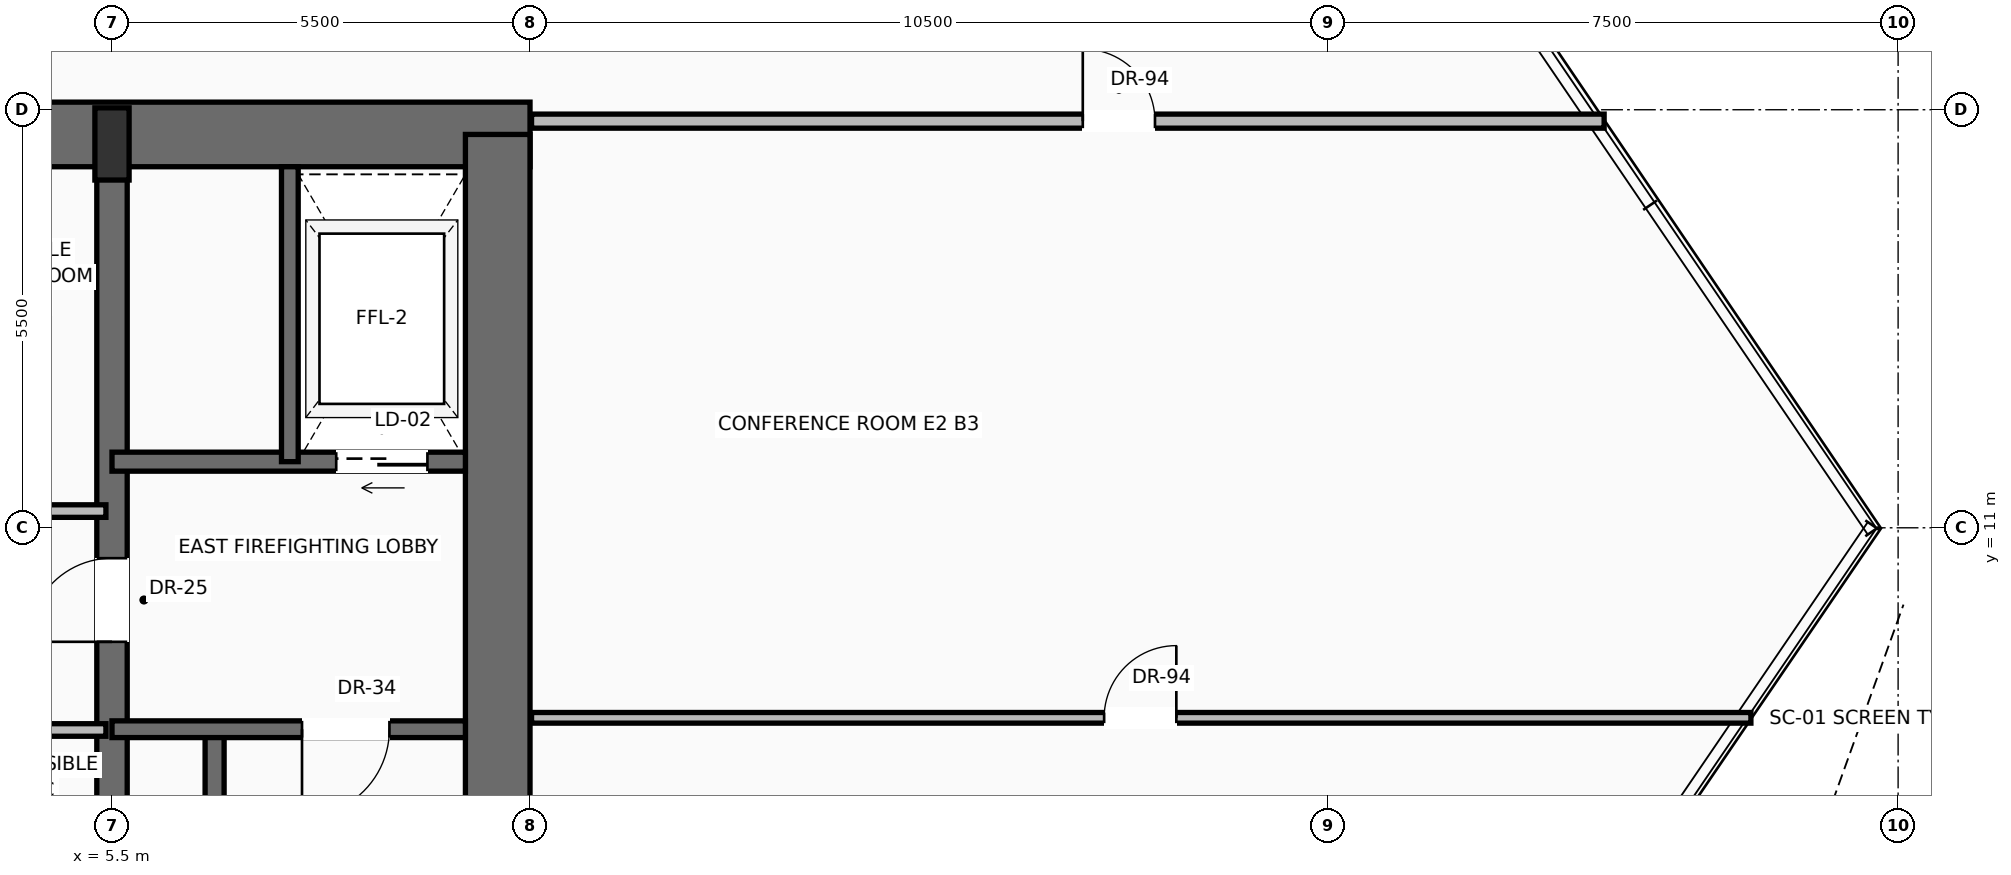
"""IFC4 building model, lengths in metres.
Left out: names, types, materials, properties, quantities, classifications, styles, units other than length and angle.
Written with IfcOpenShell. Run it as: python <this file> out.ifc"""

import sys

from ifc_helpers import new_model, si_unit, direction, frame, frame_2d, origin, origin_2d, place, context, subcontext, project, spatial, rectangle, extrude, source, transform, mapped, element, fill, save


model = new_model("IFC4")
c1 = context("Model", 3, precision=1e-05, world=origin(), true_north=direction((0.0, 1.0)))
c2 = subcontext(c1, "Body", "Model", "MODEL_VIEW")
j1 = project(units=[si_unit("LENGTHUNIT", "METRE"), si_unit("PLANEANGLEUNIT", "RADIAN")], contexts=[c1])
p1 = place(None, origin())
s1 = spatial("IfcSite", under=j1, at=p1, CompositionType="ELEMENT")
p2 = place(p1, origin())
s2 = spatial("IfcBuilding", under=s1, at=p2, CompositionType="ELEMENT")
p3 = place(p2, frame((0.0, 0.0, 34.9)))
s3 = spatial("IfcBuildingStorey", under=s2, at=p3, CompositionType="ELEMENT", Elevation=34.9)
p4 = place(p3, frame((-11.0, 16.175, 0.0), z_axis=(0.0, 0.0, 1.0), x_axis=(1.0, 0.0, 0.0)))
e1 = element("IfcWall", 1, at=p4, inside=s3, PredefinedType="SHEAR", context=c2, shape_type="SweptSolid", body=[
    extrude(rectangle(XDim=22.0, YDim=0.85, at=frame_2d((11.0, 0.0))), origin(), (0.0, 0.0, 1.0), 3.45),
])
p5 = place(p4, frame((3.57, 0.0, 0.0)))
e2 = element("IfcOpeningElement", 2, at=p5, cuts=e1, PredefinedType="OPENING", context=c2, shape_type="SweptSolid", body=[
    extrude(rectangle(XDim=1.3, YDim=2.3, at=frame_2d((0.65, 1.15))), frame((0.0, 0.435, 0.0), z_axis=(0.0, -1.0, 0.0), x_axis=(1.0, 0.0, 0.0)), (0.0, 0.0, 1.0), 0.87),
])
p6 = place(p4, frame((10.0, 0.0, 0.0)))
e3 = element("IfcOpeningElement", 3, at=p6, cuts=e1, PredefinedType="OPENING", context=c2, shape_type="SweptSolid", body=[
    extrude(rectangle(XDim=2.0, YDim=2.4, at=frame_2d((1.0, 1.2))), frame((0.0, 0.435, 0.0), z_axis=(0.0, -1.0, 0.0), x_axis=(1.0, 0.0, 0.0)), (0.0, 0.0, 1.0), 0.87),
])
p7 = place(p3, frame((10.575, 0.425, 0.0), z_axis=(0.0, 0.0, 1.0), x_axis=(0.0, 1.0, 0.0)))
e4 = element("IfcWall", 4, at=p7, inside=s3, PredefinedType="SHEAR", context=c2, shape_type="SweptSolid", body=[
    extrude(rectangle(XDim=15.75, YDim=0.85, at=frame_2d((7.875, 0.0))), origin(), (0.0, 0.0, 1.0), 3.45),
])
p8 = place(p3, frame((5.5, 0.425, 0.0), z_axis=(0.0, 0.0, 1.0), x_axis=(0.0, 1.0, 0.0)))
e5 = element("IfcWall", 5, at=p8, inside=s3, PredefinedType="SHEAR", context=c2, shape_type="SweptSolid", body=[
    extrude(rectangle(XDim=15.75, YDim=0.4, at=frame_2d((7.875, 0.0))), origin(), (0.0, 0.0, 1.0), 3.45),
])
p9 = place(p8, frame((9.075, 0.0, 0.0)))
e6 = element("IfcOpeningElement", 6, at=p9, cuts=e5, PredefinedType="OPENING", context=c2, shape_type="SweptSolid", body=[
    extrude(rectangle(XDim=1.1, YDim=2.2, at=frame_2d((0.55, 1.1))), frame((0.0, 0.21, 0.0), z_axis=(0.0, -1.0, 0.0), x_axis=(1.0, 0.0, 0.0)), (0.0, 0.0, 1.0), 0.42),
])
m1 = source(origin(), c2, "Body", "SweptSolid", [
    extrude(rectangle(XDim=0.45, YDim=0.95, at=origin_2d()), origin(), (0.0, 0.0, 1.0), 3.7),
])
p10 = place(p3, frame((5.5, 16.05, 0.0), z_axis=(0.0, 0.0, 1.0), x_axis=(1.0, 0.0, 0.0)))
e7 = element("IfcColumn", 7, at=p10, inside=s3, PredefinedType="PILASTER", context=c2, shape_type="MappedRepresentation", body=[
    mapped(m1, transform((0.0, 0.0, 0.0), scale=1.0)),
])
p11 = place(p3, frame((6.85, 0.85, 0.0), z_axis=(0.0, 0.0, 1.0), x_axis=(0.0, 1.0, 0.0)))
e8 = element("IfcWall", 8, at=p11, inside=s3, PredefinedType="SOLIDWALL", context=c2, shape_type="SweptSolid", body=[
    extrude(rectangle(XDim=7.5, YDim=0.25, at=frame_2d((3.75, 0.0))), origin(), (0.0, 0.0, 1.0), 3.45),
])
p12 = place(p3, frame((10.15, 8.35, 0.0), z_axis=(0.0, 0.0, 1.0), x_axis=(-1.0, 0.0, 0.0)))
e9 = element("IfcWall", 9, at=p12, inside=s3, PredefinedType="SOLIDWALL", context=c2, shape_type="SweptSolid", body=[
    extrude(rectangle(XDim=4.65, YDim=0.22, at=frame_2d((2.325, 0.0))), origin(), (0.0, 0.0, 1.0), 3.45),
])
p13 = place(p12, frame((1.0, 0.0, 0.0)))
e10 = element("IfcOpeningElement", 10, at=p13, cuts=e9, PredefinedType="OPENING", context=c2, shape_type="SweptSolid", body=[
    extrude(rectangle(XDim=1.15, YDim=2.2, at=frame_2d((0.575, 1.1))), frame((0.0, 0.12, 0.0), z_axis=(0.0, -1.0, 0.0), x_axis=(1.0, 0.0, 0.0)), (0.0, 0.0, 1.0), 0.24),
])
p14 = place(p3, frame((10.15, 11.87, 0.0), z_axis=(0.0, 0.0, 1.0), x_axis=(-1.0, 0.0, 0.0)))
e11 = element("IfcWall", 11, at=p14, inside=s3, PredefinedType="SOLIDWALL", context=c2, shape_type="SweptSolid", body=[
    extrude(rectangle(XDim=4.65, YDim=0.25, at=frame_2d((2.325, 0.0))), origin(), (0.0, 0.0, 1.0), 3.45),
])
p15 = place(p14, frame((0.5, 0.0, 0.0)))
e12 = element("IfcOpeningElement", 12, at=p15, cuts=e11, PredefinedType="OPENING", context=c2, shape_type="SweptSolid", body=[
    extrude(rectangle(XDim=1.2, YDim=2.25, at=frame_2d((0.6, 1.125))), frame((0.0, 0.135, 0.0), z_axis=(0.0, -1.0, 0.0), x_axis=(1.0, 0.0, 0.0)), (0.0, 0.0, 1.0), 0.27),
])
p16 = place(p3, frame((7.84, 11.87, 0.0), z_axis=(0.0, 0.0, 1.0), x_axis=(0.0, 1.0, 0.0)))
e13 = element("IfcWall", 13, at=p16, inside=s3, PredefinedType="SOLIDWALL", context=c2, shape_type="SweptSolid", body=[
    extrude(rectangle(XDim=3.88, YDim=0.22, at=frame_2d((1.94, 0.0))), origin(), (0.0, 0.0, 1.0), 3.45),
])
for number, where, z_axis, x_axis in (
    (14, (3.54, 8.34, 0.0), (0.0, 0.0, 1.0), (1.0, 0.0, 0.0)),
    (15, (3.54, 11.22, 0.0), (0.0, 0.0, 1.0), (1.0, 0.0, 0.0)),
):
    element("IfcWall", number, at=place(p3, frame(where, z_axis=z_axis, x_axis=x_axis)), inside=s3, PredefinedType="PARTITIONING", context=c2, shape_type="SweptSolid", body=[
        extrude(rectangle(XDim=1.88, YDim=0.165, at=frame_2d((0.94, 0.0))), origin(), (0.0, 0.0, 1.0), 3.442),
    ])
p17 = place(p3, frame((11.02, 16.35, 0.0), z_axis=(0.0, 0.0, 1.0), x_axis=(1.0, 0.0, 0.0)))
e16 = element("IfcWall", 16, at=p17, inside=s3, PredefinedType="PARTITIONING", context=c2, shape_type="SweptSolid", body=[
    extrude(rectangle(XDim=14.112, YDim=0.185, at=frame_2d((7.056, 0.0))), origin(), (0.0, 0.0, 1.0), 2.747),
])
p18 = place(p17, frame((7.253, 0.0, 0.0)))
e17 = element("IfcOpeningElement", 17, at=p18, cuts=e16, PredefinedType="OPENING", context=c2, shape_type="SweptSolid", body=[
    extrude(rectangle(XDim=0.95, YDim=2.2, at=frame_2d((0.475, 1.1))), frame((0.0, 0.103, 0.0), z_axis=(0.0, -1.0, 0.0), x_axis=(1.0, 0.0, 0.0)), (0.0, 0.0, 1.0), 0.205),
])
p19 = place(p3, frame((11.02, 8.5, 0.0), z_axis=(0.0, 0.0, 1.0), x_axis=(1.0, 0.0, 0.0)))
e18 = element("IfcWall", 18, at=p19, inside=s3, PredefinedType="PARTITIONING", context=c2, shape_type="SweptSolid", body=[
    extrude(rectangle(XDim=16.043, YDim=0.14, at=frame_2d((8.021, 0.0))), origin(), (0.0, 0.0, 1.0), 3.442),
])
p20 = place(p19, frame((7.534, 0.0, 0.0)))
e19 = element("IfcOpeningElement", 19, at=p20, cuts=e18, PredefinedType="OPENING", context=c2, shape_type="SweptSolid", body=[
    extrude(rectangle(XDim=0.95, YDim=2.2, at=frame_2d((0.475, 1.1))), frame((0.0, 0.08, 0.0), z_axis=(0.0, -1.0, 0.0), x_axis=(1.0, 0.0, 0.0)), (0.0, 0.0, 1.0), 0.16),
])
m2 = source(origin(), c2, "Body", "SweptSolid", [
    extrude(rectangle(XDim=1.15, YDim=2.2, at=frame_2d((0.575, 1.1))), frame((0.0, 0.025, 0.0), z_axis=(0.0, -1.0, 0.0), x_axis=(1.0, 0.0, 0.0)), (0.0, 0.0, 1.0), 0.05),
])
p21 = place(p13, origin())
e20 = element("IfcDoor", 20, at=p21, inside=s3, OperationType="SINGLE_SWING_RIGHT", PredefinedType="DOOR", context=c2, shape_type="MappedRepresentation", body=[
    mapped(m2, transform((0.0, 0.0, 0.0), scale=1.0)),
])
fill(e10, e20)
m3 = source(origin(), c2, "Body", "SweptSolid", [
    extrude(rectangle(XDim=1.1, YDim=2.2, at=frame_2d((0.55, 1.1))), frame((0.0, 0.025, 0.0), z_axis=(0.0, -1.0, 0.0), x_axis=(1.0, 0.0, 0.0)), (0.0, 0.0, 1.0), 0.05),
])
p22 = place(p9, origin())
e21 = element("IfcDoor", 21, at=p22, inside=s3, OperationType="SINGLE_SWING_LEFT", PredefinedType="DOOR", context=c2, shape_type="MappedRepresentation", body=[
    mapped(m3, transform((0.0, 0.0, 0.0), scale=1.0)),
])
fill(e6, e21)
m4 = source(origin(), c2, "Body", "SweptSolid", [
    extrude(rectangle(XDim=1.2, YDim=2.25, at=frame_2d((0.6, 1.125))), frame((0.0, 0.025, 0.0), z_axis=(0.0, -1.0, 0.0), x_axis=(1.0, 0.0, 0.0)), (0.0, 0.0, 1.0), 0.05),
])
p23 = place(p15, origin())
e22 = element("IfcDoor", 22, at=p23, inside=s3, OperationType="SLIDING_TO_RIGHT", PredefinedType="DOOR", context=c2, shape_type="MappedRepresentation", body=[
    mapped(m4, transform((0.0, 0.0, 0.0), scale=1.0)),
])
fill(e12, e22)
m5 = source(origin(), c2, "Body", "SweptSolid", [
    extrude(rectangle(XDim=0.95, YDim=2.2, at=frame_2d((0.475, 1.1))), frame((0.0, 0.025, 0.0), z_axis=(0.0, -1.0, 0.0), x_axis=(1.0, 0.0, 0.0)), (0.0, 0.0, 1.0), 0.05),
])
p24 = place(p18, origin())
e23 = element("IfcDoor", 23, at=p24, inside=s3, OperationType="SINGLE_SWING_LEFT", PredefinedType="DOOR", context=c2, shape_type="MappedRepresentation", body=[
    mapped(m5, transform((0.0, 0.0, 0.0), scale=1.0)),
])
fill(e17, e23)
p25 = place(p20, origin())
e24 = element("IfcDoor", 24, at=p25, inside=s3, OperationType="SINGLE_SWING_RIGHT", PredefinedType="DOOR", context=c2, shape_type="MappedRepresentation", body=[
    mapped(m5, transform((0.0, 0.0, 0.0), scale=1.0)),
])
fill(e19, e24)
save(model, sys.argv[1])
